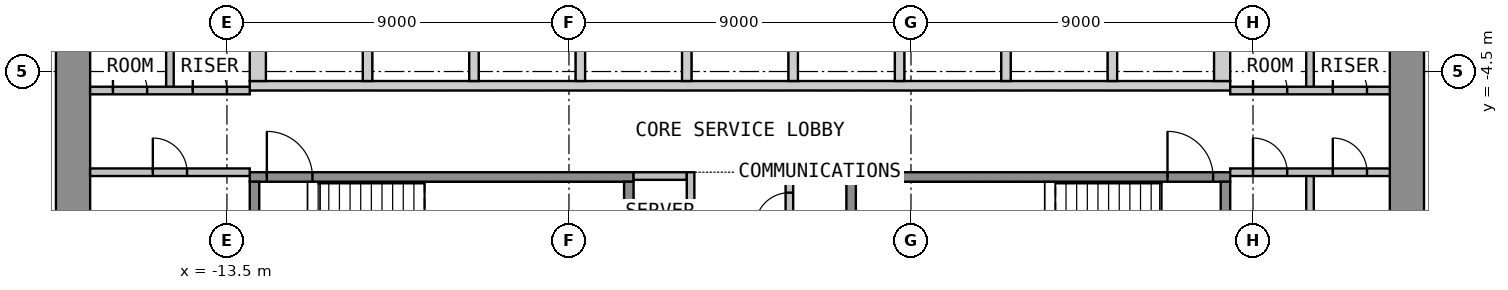
"""IFC4 building model, lengths in metres.
Left out: names, types, materials, properties, quantities, classifications, styles, units other than length and angle.
Written with IfcOpenShell. Run it as: python <this file> out.ifc"""

import sys

from ifc_helpers import new_model, si_unit, direction, frame, frame_2d, origin, place, context, subcontext, project, spatial, polyline, rectangle, outline, extrude, element, fill, save


model = new_model("IFC4")
c1 = context("Model", 3, precision=1e-05, world=origin(), true_north=direction((0.0, 1.0)))
c2 = subcontext(c1, "Body", "Model", "MODEL_VIEW")
j1 = project(units=[si_unit("LENGTHUNIT", "METRE"), si_unit("PLANEANGLEUNIT", "RADIAN")], contexts=[c1])
p1 = place(None, origin())
s1 = spatial("IfcSite", under=j1, at=p1, CompositionType="ELEMENT")
p2 = place(p1, origin())
s2 = spatial("IfcBuilding", under=s1, at=p2, CompositionType="ELEMENT")
p3 = place(p2, frame((0.0, 0.0, 81.3)))
s3 = spatial("IfcBuildingStorey", under=s2, at=p3, CompositionType="ELEMENT", Elevation=81.3)
p4 = place(p3, frame((-17.55, -12.6, 0.0), z_axis=(0.0, 0.0, 1.0), x_axis=(0.0, 1.0, 0.0)))
e1 = element("IfcWall", 1, at=p4, inside=s3, PredefinedType="SHEAR", context=c2, shape_type="SweptSolid", body=[
    extrude(rectangle(XDim=25.2, YDim=0.9, at=frame_2d((12.6, 0.0))), origin(), (0.0, 0.0, 1.0), 3.525),
])
p5 = place(p4, frame((11.4, 0.0, 0.0)))
e2 = element("IfcOpeningElement", 2, at=p5, cuts=e1, PredefinedType="OPENING", context=c2, shape_type="SweptSolid", body=[
    extrude(rectangle(XDim=2.4, YDim=2.1, at=frame_2d((1.2, 1.05))), frame((0.0, 0.46, 0.0), z_axis=(0.0, -1.0, 0.0), x_axis=(1.0, 0.0, 0.0)), (0.0, 0.0, 1.0), 0.92),
])
p6 = place(p3, frame((17.55, -12.6, 0.0), z_axis=(0.0, 0.0, 1.0), x_axis=(0.0, 1.0, 0.0)))
e3 = element("IfcWall", 3, at=p6, inside=s3, PredefinedType="SHEAR", context=c2, shape_type="SweptSolid", body=[
    extrude(rectangle(XDim=25.2, YDim=0.9, at=frame_2d((12.6, 0.0))), origin(), (0.0, 0.0, 1.0), 3.525),
])
p7 = place(p6, frame((11.4, 0.0, 0.0)))
e4 = element("IfcOpeningElement", 4, at=p7, cuts=e3, PredefinedType="OPENING", context=c2, shape_type="SweptSolid", body=[
    extrude(rectangle(XDim=2.4, YDim=2.1, at=frame_2d((1.2, 1.05))), frame((0.0, 0.46, 0.0), z_axis=(0.0, -1.0, 0.0), x_axis=(1.0, 0.0, 0.0)), (0.0, 0.0, 1.0), 0.92),
])
p8 = place(p3, origin())
e5 = element("IfcWall", 5, at=p8, inside=s3, PredefinedType="SHEAR", context=c2, shape_type="SweptSolid", body=[
    extrude(outline(polyline([(-12.9, -5.0), (12.9, -5.0), (12.9, -4.75), (-12.9, -4.75), (-12.9, -5.0)])), origin(), (0.0, 0.0, 1.0), 3.525),
])
p9 = place(p3, origin())
e6 = element("IfcWall", 6, at=p9, inside=s3, PredefinedType="SHEAR", context=c2, shape_type="SweptSolid", body=[
    extrude(outline(polyline([(-12.9, -4.75), (-12.475, -4.75), (-12.475, -2.05), (-12.9, -2.05), (-12.9, -4.75)])), origin(), (0.0, 0.0, 1.0), 3.525),
])
p10 = place(p3, origin())
e7 = element("IfcWall", 7, at=p10, inside=s3, PredefinedType="SHEAR", context=c2, shape_type="SweptSolid", body=[
    extrude(outline(polyline([(-9.925, -4.75), (-9.675, -4.75), (-9.675, -2.05), (-9.925, -2.05), (-9.925, -4.75)])), origin(), (0.0, 0.0, 1.0), 3.525),
])
p11 = place(p3, origin())
e8 = element("IfcWall", 8, at=p11, inside=s3, PredefinedType="SHEAR", context=c2, shape_type="SweptSolid", body=[
    extrude(outline(polyline([(-7.125, -4.75), (-6.875, -4.75), (-6.875, -2.05), (-7.125, -2.05), (-7.125, -4.75)])), origin(), (0.0, 0.0, 1.0), 3.525),
])
p12 = place(p3, origin())
e9 = element("IfcWall", 9, at=p12, inside=s3, PredefinedType="SHEAR", context=c2, shape_type="SweptSolid", body=[
    extrude(outline(polyline([(-4.325, -4.75), (-4.075, -4.75), (-4.075, -2.05), (-4.325, -2.05), (-4.325, -4.75)])), origin(), (0.0, 0.0, 1.0), 3.525),
])
p13 = place(p3, origin())
e10 = element("IfcWall", 10, at=p13, inside=s3, PredefinedType="SHEAR", context=c2, shape_type="SweptSolid", body=[
    extrude(outline(polyline([(-1.525, -4.75), (-1.275, -4.75), (-1.275, -2.05), (-1.525, -2.05), (-1.525, -4.75)])), origin(), (0.0, 0.0, 1.0), 3.525),
])
p14 = place(p3, origin())
e11 = element("IfcWall", 11, at=p14, inside=s3, PredefinedType="SHEAR", context=c2, shape_type="SweptSolid", body=[
    extrude(outline(polyline([(1.275, -4.75), (1.525, -4.75), (1.525, -2.05), (1.275, -2.05), (1.275, -4.75)])), origin(), (0.0, 0.0, 1.0), 3.525),
])
p15 = place(p3, origin())
e12 = element("IfcWall", 12, at=p15, inside=s3, PredefinedType="SHEAR", context=c2, shape_type="SweptSolid", body=[
    extrude(outline(polyline([(4.075, -4.75), (4.325, -4.75), (4.325, -2.05), (4.075, -2.05), (4.075, -4.75)])), origin(), (0.0, 0.0, 1.0), 3.525),
])
p16 = place(p3, origin())
e13 = element("IfcWall", 13, at=p16, inside=s3, PredefinedType="SHEAR", context=c2, shape_type="SweptSolid", body=[
    extrude(outline(polyline([(6.875, -4.75), (7.125, -4.75), (7.125, -2.05), (6.875, -2.05), (6.875, -4.75)])), origin(), (0.0, 0.0, 1.0), 3.525),
])
p17 = place(p3, origin())
e14 = element("IfcWall", 14, at=p17, inside=s3, PredefinedType="SHEAR", context=c2, shape_type="SweptSolid", body=[
    extrude(outline(polyline([(9.675, -4.75), (9.925, -4.75), (9.925, -2.05), (9.675, -2.05), (9.675, -4.75)])), origin(), (0.0, 0.0, 1.0), 3.525),
])
p18 = place(p3, origin())
e15 = element("IfcWall", 15, at=p18, inside=s3, PredefinedType="SHEAR", context=c2, shape_type="SweptSolid", body=[
    extrude(outline(polyline([(12.475, -4.75), (12.9, -4.75), (12.9, -2.05), (12.475, -2.05), (12.475, -4.75)])), origin(), (0.0, 0.0, 1.0), 3.525),
])
p19 = place(p3, frame((-12.9, -7.275, 0.0), z_axis=(0.0, 0.0, 1.0), x_axis=(1.0, 0.0, 0.0)))
e16 = element("IfcWall", 16, at=p19, inside=s3, PredefinedType="SHEAR", context=c2, shape_type="SweptSolid", body=[
    extrude(rectangle(XDim=10.1, YDim=0.25, at=frame_2d((5.05, 0.0))), origin(), (0.0, 0.0, 1.0), 3.525),
])
p20 = place(p19, frame((0.45, 0.0, 0.0)))
e17 = element("IfcOpeningElement", 17, at=p20, cuts=e16, PredefinedType="OPENING", context=c2, shape_type="SweptSolid", body=[
    extrude(rectangle(XDim=1.2, YDim=2.1, at=frame_2d((0.6, 1.05))), frame((0.0, 0.135, 0.0), z_axis=(0.0, -1.0, 0.0), x_axis=(1.0, 0.0, 0.0)), (0.0, 0.0, 1.0), 0.27),
])
for number, where, z_axis, x_axis in (
    (18, (-12.775, -10.65, 0.0), (0.0, 0.0, 1.0), (0.0, 1.0, 0.0)),
    (19, (-2.925, -10.65, 0.0), (0.0, 0.0, 1.0), (0.0, 1.0, 0.0)),
):
    element("IfcWall", number, at=place(p3, frame(where, z_axis=z_axis, x_axis=x_axis)), inside=s3, PredefinedType="SHEAR", context=c2, shape_type="SweptSolid", body=[
        extrude(rectangle(XDim=3.25, YDim=0.25, at=frame_2d((1.625, 0.0))), origin(), (0.0, 0.0, 1.0), 3.525),
    ])
p21 = place(p3, frame((2.8, -7.275, 0.0), z_axis=(0.0, 0.0, 1.0), x_axis=(1.0, 0.0, 0.0)))
e20 = element("IfcWall", 20, at=p21, inside=s3, PredefinedType="SHEAR", context=c2, shape_type="SweptSolid", body=[
    extrude(rectangle(XDim=10.1, YDim=0.25, at=frame_2d((5.05, 0.0))), origin(), (0.0, 0.0, 1.0), 3.525),
])
p22 = place(p21, frame((8.45, 0.0, 0.0)))
e21 = element("IfcOpeningElement", 21, at=p22, cuts=e20, PredefinedType="OPENING", context=c2, shape_type="SweptSolid", body=[
    extrude(rectangle(XDim=1.2, YDim=2.1, at=frame_2d((0.6, 1.05))), frame((0.0, 0.135, 0.0), z_axis=(0.0, -1.0, 0.0), x_axis=(1.0, 0.0, 0.0)), (0.0, 0.0, 1.0), 0.27),
])
for number, where, z_axis, x_axis in (
    (22, (2.925, -10.65, 0.0), (0.0, 0.0, 1.0), (0.0, 1.0, 0.0)),
    (23, (12.775, -10.65, 0.0), (0.0, 0.0, 1.0), (0.0, 1.0, 0.0)),
):
    element("IfcWall", number, at=place(p3, frame(where, z_axis=z_axis, x_axis=x_axis)), inside=s3, PredefinedType="SHEAR", context=c2, shape_type="SweptSolid", body=[
        extrude(rectangle(XDim=3.25, YDim=0.25, at=frame_2d((1.625, 0.0))), origin(), (0.0, 0.0, 1.0), 3.525),
    ])
for number, where, z_axis, x_axis in (
    (24, (-2.8, -7.25, 0.0), (0.0, 0.0, 1.0), (1.0, 0.0, 0.0)),
    (25, (1.4, -7.25, 0.0), (0.0, 0.0, 1.0), (1.0, 0.0, 0.0)),
):
    element("IfcWall", number, at=place(p3, frame(where, z_axis=z_axis, x_axis=x_axis)), inside=s3, PredefinedType="PARTITIONING", context=c2, shape_type="SweptSolid", body=[
        extrude(rectangle(XDim=1.4, YDim=0.2, at=frame_2d((0.7, 0.0))), origin(), (0.0, 0.0, 1.0), 3.525),
    ])
p23 = place(p3, frame((-1.3, -12.6, 0.0), z_axis=(0.0, 0.0, 1.0), x_axis=(0.0, 1.0, 0.0)))
e26 = element("IfcWall", 26, at=p23, inside=s3, PredefinedType="PARTITIONING", context=c2, shape_type="SweptSolid", body=[
    extrude(rectangle(XDim=5.45, YDim=0.2, at=frame_2d((2.725, 0.0))), origin(), (0.0, 0.0, 1.0), 3.525),
])
p24 = place(p23, frame((0.337, 0.0, 0.0)))
e27 = element("IfcOpeningElement", 27, at=p24, cuts=e26, PredefinedType="OPENING", context=c2, shape_type="SweptSolid", body=[
    extrude(rectangle(XDim=0.9, YDim=2.1, at=frame_2d((0.45, 1.05))), frame((0.0, 0.11, 0.0), z_axis=(0.0, -1.0, 0.0), x_axis=(1.0, 0.0, 0.0)), (0.0, 0.0, 1.0), 0.22),
])
p25 = place(p23, frame((2.962, 0.0, 0.0)))
e28 = element("IfcOpeningElement", 28, at=p25, cuts=e26, PredefinedType="OPENING", context=c2, shape_type="SweptSolid", body=[
    extrude(rectangle(XDim=0.9, YDim=2.1, at=frame_2d((0.45, 1.05))), frame((0.0, 0.11, 0.0), z_axis=(0.0, -1.0, 0.0), x_axis=(1.0, 0.0, 0.0)), (0.0, 0.0, 1.0), 0.22),
])
p26 = place(p3, frame((1.3, -12.6, 0.0), z_axis=(0.0, 0.0, 1.0), x_axis=(0.0, 1.0, 0.0)))
e29 = element("IfcWall", 29, at=p26, inside=s3, PredefinedType="PARTITIONING", context=c2, shape_type="SweptSolid", body=[
    extrude(rectangle(XDim=5.45, YDim=0.2, at=frame_2d((2.725, 0.0))), origin(), (0.0, 0.0, 1.0), 3.525),
])
p27 = place(p26, frame((1.387, 0.0, 0.0)))
e30 = element("IfcOpeningElement", 30, at=p27, cuts=e29, PredefinedType="OPENING", context=c2, shape_type="SweptSolid", body=[
    extrude(rectangle(XDim=0.9, YDim=2.1, at=frame_2d((0.45, 1.05))), frame((0.0, 0.11, 0.0), z_axis=(0.0, -1.0, 0.0), x_axis=(1.0, 0.0, 0.0)), (0.0, 0.0, 1.0), 0.22),
])
p28 = place(p26, frame((4.012, 0.0, 0.0)))
e31 = element("IfcOpeningElement", 31, at=p28, cuts=e29, PredefinedType="OPENING", context=c2, shape_type="SweptSolid", body=[
    extrude(rectangle(XDim=0.9, YDim=2.1, at=frame_2d((0.45, 1.05))), frame((0.0, 0.11, 0.0), z_axis=(0.0, -1.0, 0.0), x_axis=(1.0, 0.0, 0.0)), (0.0, 0.0, 1.0), 0.22),
])
p29 = place(p3, frame((-17.1, -7.15, 0.0), z_axis=(0.0, 0.0, 1.0), x_axis=(1.0, 0.0, 0.0)))
e32 = element("IfcWall", 32, at=p29, inside=s3, PredefinedType="PARTITIONING", context=c2, shape_type="SweptSolid", body=[
    extrude(rectangle(XDim=4.2, YDim=0.2, at=frame_2d((2.1, 0.0))), origin(), (0.0, 0.0, 1.0), 3.525),
])
p30 = place(p29, frame((1.65, 0.0, 0.0)))
e33 = element("IfcOpeningElement", 33, at=p30, cuts=e32, PredefinedType="OPENING", context=c2, shape_type="SweptSolid", body=[
    extrude(rectangle(XDim=0.9, YDim=2.1, at=frame_2d((0.45, 1.05))), frame((0.0, 0.11, 0.0), z_axis=(0.0, -1.0, 0.0), x_axis=(1.0, 0.0, 0.0)), (0.0, 0.0, 1.0), 0.22),
])
p31 = place(p3, frame((-15.0, -5.0, 0.0), z_axis=(0.0, 0.0, 1.0), x_axis=(0.0, 1.0, 0.0)))
e34 = element("IfcWall", 34, at=p31, inside=s3, PredefinedType="PARTITIONING", context=c2, shape_type="SweptSolid", body=[
    extrude(rectangle(XDim=3.2, YDim=0.2, at=frame_2d((1.6, 0.0))), origin(), (0.0, 0.0, 1.0), 3.525),
])
p32 = place(p3, frame((-17.1, -5.0, 0.0), z_axis=(0.0, 0.0, 1.0), x_axis=(1.0, 0.0, 0.0)))
e35 = element("IfcWall", 35, at=p32, inside=s3, PredefinedType="PARTITIONING", context=c2, shape_type="SweptSolid", body=[
    extrude(rectangle(XDim=4.2, YDim=0.2, at=frame_2d((2.1, 0.0))), origin(), (0.0, 0.0, 1.0), 3.525),
])
p33 = place(p32, frame((0.6, 0.0, 0.0)))
e36 = element("IfcOpeningElement", 36, at=p33, cuts=e35, PredefinedType="OPENING", context=c2, shape_type="SweptSolid", body=[
    extrude(rectangle(XDim=0.9, YDim=2.1, at=frame_2d((0.45, 1.05))), frame((0.0, 0.11, 0.0), z_axis=(0.0, -1.0, 0.0), x_axis=(1.0, 0.0, 0.0)), (0.0, 0.0, 1.0), 0.22),
])
p34 = place(p32, frame((2.7, 0.0, 0.0)))
e37 = element("IfcOpeningElement", 37, at=p34, cuts=e35, PredefinedType="OPENING", context=c2, shape_type="SweptSolid", body=[
    extrude(rectangle(XDim=0.9, YDim=2.1, at=frame_2d((0.45, 1.05))), frame((0.0, 0.11, 0.0), z_axis=(0.0, -1.0, 0.0), x_axis=(1.0, 0.0, 0.0)), (0.0, 0.0, 1.0), 0.22),
])
p35 = place(p3, frame((15.0, -12.6, 0.0), z_axis=(0.0, 0.0, 1.0), x_axis=(0.0, 1.0, 0.0)))
e38 = element("IfcWall", 38, at=p35, inside=s3, PredefinedType="PARTITIONING", context=c2, shape_type="SweptSolid", body=[
    extrude(rectangle(XDim=5.45, YDim=0.2, at=frame_2d((2.725, 0.0))), origin(), (0.0, 0.0, 1.0), 3.525),
])
p36 = place(p3, frame((12.9, -7.15, 0.0), z_axis=(0.0, 0.0, 1.0), x_axis=(1.0, 0.0, 0.0)))
e39 = element("IfcWall", 39, at=p36, inside=s3, PredefinedType="PARTITIONING", context=c2, shape_type="SweptSolid", body=[
    extrude(rectangle(XDim=4.2, YDim=0.2, at=frame_2d((2.1, 0.0))), origin(), (0.0, 0.0, 1.0), 3.525),
])
p37 = place(p36, frame((0.6, 0.0, 0.0)))
e40 = element("IfcOpeningElement", 40, at=p37, cuts=e39, PredefinedType="OPENING", context=c2, shape_type="SweptSolid", body=[
    extrude(rectangle(XDim=0.9, YDim=2.1, at=frame_2d((0.45, 1.05))), frame((0.0, 0.11, 0.0), z_axis=(0.0, -1.0, 0.0), x_axis=(1.0, 0.0, 0.0)), (0.0, 0.0, 1.0), 0.22),
])
p38 = place(p36, frame((2.7, 0.0, 0.0)))
e41 = element("IfcOpeningElement", 41, at=p38, cuts=e39, PredefinedType="OPENING", context=c2, shape_type="SweptSolid", body=[
    extrude(rectangle(XDim=0.9, YDim=2.1, at=frame_2d((0.45, 1.05))), frame((0.0, 0.11, 0.0), z_axis=(0.0, -1.0, 0.0), x_axis=(1.0, 0.0, 0.0)), (0.0, 0.0, 1.0), 0.22),
])
p39 = place(p3, frame((15.0, -5.0, 0.0), z_axis=(0.0, 0.0, 1.0), x_axis=(0.0, 1.0, 0.0)))
e42 = element("IfcWall", 42, at=p39, inside=s3, PredefinedType="PARTITIONING", context=c2, shape_type="SweptSolid", body=[
    extrude(rectangle(XDim=3.2, YDim=0.2, at=frame_2d((1.6, 0.0))), origin(), (0.0, 0.0, 1.0), 3.525),
])
p40 = place(p3, frame((12.9, -5.0, 0.0), z_axis=(0.0, 0.0, 1.0), x_axis=(1.0, 0.0, 0.0)))
e43 = element("IfcWall", 43, at=p40, inside=s3, PredefinedType="PARTITIONING", context=c2, shape_type="SweptSolid", body=[
    extrude(rectangle(XDim=4.2, YDim=0.2, at=frame_2d((2.1, 0.0))), origin(), (0.0, 0.0, 1.0), 3.525),
])
p41 = place(p40, frame((0.6, 0.0, 0.0)))
e44 = element("IfcOpeningElement", 44, at=p41, cuts=e43, PredefinedType="OPENING", context=c2, shape_type="SweptSolid", body=[
    extrude(rectangle(XDim=0.9, YDim=2.1, at=frame_2d((0.45, 1.05))), frame((0.0, 0.11, 0.0), z_axis=(0.0, -1.0, 0.0), x_axis=(1.0, 0.0, 0.0)), (0.0, 0.0, 1.0), 0.22),
])
p42 = place(p40, frame((2.7, 0.0, 0.0)))
e45 = element("IfcOpeningElement", 45, at=p42, cuts=e43, PredefinedType="OPENING", context=c2, shape_type="SweptSolid", body=[
    extrude(rectangle(XDim=0.9, YDim=2.1, at=frame_2d((0.45, 1.05))), frame((0.0, 0.11, 0.0), z_axis=(0.0, -1.0, 0.0), x_axis=(1.0, 0.0, 0.0)), (0.0, 0.0, 1.0), 0.22),
])
p43 = place(p20, origin())
e46 = element("IfcDoor", 46, at=p43, inside=s3, OperationType="SINGLE_SWING_LEFT", PredefinedType="DOOR", context=c2, shape_type="SweptSolid", body=[
    extrude(rectangle(XDim=1.2, YDim=2.1, at=frame_2d((0.6, 1.05))), frame((0.0, 0.025, 0.0), z_axis=(0.0, -1.0, 0.0), x_axis=(1.0, 0.0, 0.0)), (0.0, 0.0, 1.0), 0.05),
])
fill(e17, e46)
p44 = place(p22, origin())
e47 = element("IfcDoor", 47, at=p44, inside=s3, OperationType="SINGLE_SWING_LEFT", PredefinedType="DOOR", context=c2, shape_type="SweptSolid", body=[
    extrude(rectangle(XDim=1.2, YDim=2.1, at=frame_2d((0.6, 1.05))), frame((0.0, 0.025, 0.0), z_axis=(0.0, -1.0, 0.0), x_axis=(1.0, 0.0, 0.0)), (0.0, 0.0, 1.0), 0.05),
])
fill(e21, e47)
p45 = place(p28, origin())
e48 = element("IfcDoor", 48, at=p45, inside=s3, OperationType="SINGLE_SWING_LEFT", PredefinedType="DOOR", context=c2, shape_type="SweptSolid", body=[
    extrude(rectangle(XDim=0.9, YDim=2.1, at=frame_2d((0.45, 1.05))), frame((0.0, 0.025, 0.0), z_axis=(0.0, -1.0, 0.0), x_axis=(1.0, 0.0, 0.0)), (0.0, 0.0, 1.0), 0.05),
])
fill(e31, e48)
p46 = place(p30, origin())
e49 = element("IfcDoor", 49, at=p46, inside=s3, OperationType="SINGLE_SWING_LEFT", PredefinedType="DOOR", context=c2, shape_type="SweptSolid", body=[
    extrude(rectangle(XDim=0.9, YDim=2.1, at=frame_2d((0.45, 1.05))), frame((0.0, 0.025, 0.0), z_axis=(0.0, -1.0, 0.0), x_axis=(1.0, 0.0, 0.0)), (0.0, 0.0, 1.0), 0.05),
])
fill(e33, e49)
p47 = place(p33, origin())
e50 = element("IfcDoor", 50, at=p47, inside=s3, OperationType="SINGLE_SWING_LEFT", PredefinedType="DOOR", context=c2, shape_type="SweptSolid", body=[
    extrude(rectangle(XDim=0.9, YDim=2.1, at=frame_2d((0.45, 1.05))), frame((0.0, 0.025, 0.0), z_axis=(0.0, -1.0, 0.0), x_axis=(1.0, 0.0, 0.0)), (0.0, 0.0, 1.0), 0.05),
])
fill(e36, e50)
p48 = place(p34, origin())
e51 = element("IfcDoor", 51, at=p48, inside=s3, OperationType="SINGLE_SWING_LEFT", PredefinedType="DOOR", context=c2, shape_type="SweptSolid", body=[
    extrude(rectangle(XDim=0.9, YDim=2.1, at=frame_2d((0.45, 1.05))), frame((0.0, 0.025, 0.0), z_axis=(0.0, -1.0, 0.0), x_axis=(1.0, 0.0, 0.0)), (0.0, 0.0, 1.0), 0.05),
])
fill(e37, e51)
p49 = place(p37, origin())
e52 = element("IfcDoor", 52, at=p49, inside=s3, OperationType="SINGLE_SWING_LEFT", PredefinedType="DOOR", context=c2, shape_type="SweptSolid", body=[
    extrude(rectangle(XDim=0.9, YDim=2.1, at=frame_2d((0.45, 1.05))), frame((0.0, 0.025, 0.0), z_axis=(0.0, -1.0, 0.0), x_axis=(1.0, 0.0, 0.0)), (0.0, 0.0, 1.0), 0.05),
])
fill(e40, e52)
p50 = place(p38, origin())
e53 = element("IfcDoor", 53, at=p50, inside=s3, OperationType="SINGLE_SWING_LEFT", PredefinedType="DOOR", context=c2, shape_type="SweptSolid", body=[
    extrude(rectangle(XDim=0.9, YDim=2.1, at=frame_2d((0.45, 1.05))), frame((0.0, 0.025, 0.0), z_axis=(0.0, -1.0, 0.0), x_axis=(1.0, 0.0, 0.0)), (0.0, 0.0, 1.0), 0.05),
])
fill(e41, e53)
p51 = place(p41, origin())
e54 = element("IfcDoor", 54, at=p51, inside=s3, OperationType="SINGLE_SWING_LEFT", PredefinedType="DOOR", context=c2, shape_type="SweptSolid", body=[
    extrude(rectangle(XDim=0.9, YDim=2.1, at=frame_2d((0.45, 1.05))), frame((0.0, 0.025, 0.0), z_axis=(0.0, -1.0, 0.0), x_axis=(1.0, 0.0, 0.0)), (0.0, 0.0, 1.0), 0.05),
])
fill(e44, e54)
p52 = place(p42, origin())
e55 = element("IfcDoor", 55, at=p52, inside=s3, OperationType="SINGLE_SWING_LEFT", PredefinedType="DOOR", context=c2, shape_type="SweptSolid", body=[
    extrude(rectangle(XDim=0.9, YDim=2.1, at=frame_2d((0.45, 1.05))), frame((0.0, 0.025, 0.0), z_axis=(0.0, -1.0, 0.0), x_axis=(1.0, 0.0, 0.0)), (0.0, 0.0, 1.0), 0.05),
])
fill(e45, e55)
save(model, sys.argv[1])
